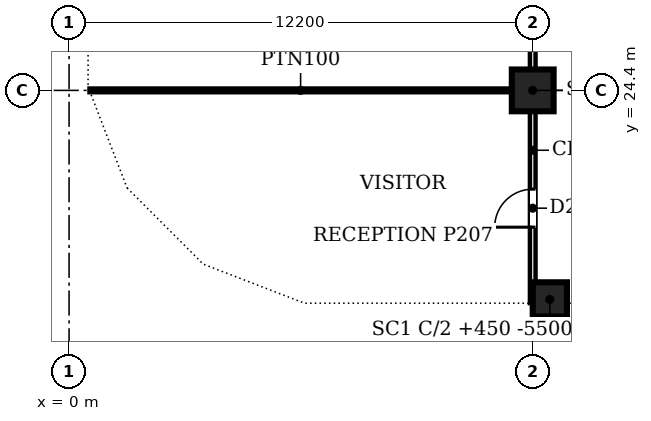
"""IFC4 building model, lengths in metres.
Left out: names, types, materials, properties, quantities, classifications, styles, units other than length and angle.
Written with IfcOpenShell. Run it as: python <this file> out.ifc"""

import sys

from ifc_helpers import new_model, si_unit, direction, frame, frame_2d, origin, origin_2d, place, context, subcontext, project, spatial, polyline, rectangle, outline, extrude, faceted_brep, source, transform, mapped, element, fill, save


model = new_model("IFC4")
c1 = context("Model", 3, precision=1e-05, world=origin(), true_north=direction((0.0, 1.0)))
c2 = subcontext(c1, "Body", "Model", "MODEL_VIEW")
j1 = project(units=[si_unit("LENGTHUNIT", "METRE"), si_unit("PLANEANGLEUNIT", "RADIAN")], contexts=[c1])
p1 = place(None, origin())
s1 = spatial("IfcSite", under=j1, at=p1, CompositionType="ELEMENT")
p2 = place(p1, origin())
s2 = spatial("IfcBuilding", under=s1, at=p2, CompositionType="ELEMENT")
p3 = place(p2, origin())
s3 = spatial("IfcBuildingStorey", under=s2, at=p3, CompositionType="ELEMENT", Elevation=0.0)
p4 = place(p3, frame((12.2, 24.4, 0.0), z_axis=(0.0, 0.0, 1.0), x_axis=(1.0, 0.0, 0.0)))
e1 = element("IfcColumn", 1, at=p4, inside=s3, PredefinedType="COLUMN", context=c2, shape_type="SweptSolid", body=[
    extrude(rectangle(XDim=1.1, YDim=1.1, at=origin_2d()), origin(), (0.0, 0.0, 1.0), 6.95),
])
p5 = place(p3, frame((12.65, 18.9, 0.0), z_axis=(0.0, 0.0, 1.0), x_axis=(1.0, 0.0, 0.0)))
e2 = element("IfcColumn", 2, at=p5, inside=s3, PredefinedType="COLUMN", context=c2, shape_type="SweptSolid", body=[
    extrude(rectangle(XDim=0.9, YDim=0.9, at=origin_2d()), origin(), (0.0, 0.0, 1.0), 7.2),
])
m1 = source(origin(), c2, "Body", "Brep", [
    faceted_brep([(0.0, -0.1, 0.0), (6.072, -0.1, 0.0), (6.072, -0.1, 8.373), (6.053, -0.1, 8.4), (6.035, 0.1, 0.0), (0.0, 0.1, 0.0), (6.035, 0.1, 8.374), (6.053, 0.0, 8.4)], [[[0, 1, 2, 3]], [[4, 5, 6]], [[5, 4, 1, 0]], [[7, 3, 2]], [[6, 5, 0, 3, 7]], [[1, 4, 6, 7, 2]]]),
])
p6 = place(p3, frame((0.25, 30.5, 0.0), z_axis=(0.0, 0.0, 1.0), x_axis=(0.0, -1.0, 0.0)))
e3 = element("IfcWall", 3, at=p6, inside=s3, PredefinedType="PARTITIONING", context=c2, shape_type="MappedRepresentation", body=[
    mapped(m1, transform((0.0, 0.0, 0.0), scale=1.0)),
])
m2 = source(origin(), c2, "Body", "SweptSolid", [
    extrude(outline(polyline([(0.293, 0.15), (5.854, 0.15), (5.854, 7.866), (0.293, 0.15)])), frame((0.0, 0.11, 0.0), z_axis=(0.0, -1.0, 0.0), x_axis=(1.0, 0.0, 0.0)), (0.0, 0.0, 1.0), 0.22),
])
p7 = place(p6, origin())
e4 = element("IfcOpeningElement", 4, at=p7, cuts=e3, PredefinedType="OPENING", context=c2, shape_type="MappedRepresentation", body=[
    mapped(m2, transform((0.0, 0.0, 0.0), scale=1.0)),
])
m3 = source(origin(), c2, "Body", "Brep", [
    faceted_brep([(0.0, -0.25, 0.0), (6.053, -0.25, 8.4), (5.44, -0.25, 8.4), (0.0, -0.25, 0.851), (0.0, 0.25, 0.851), (5.44, 0.25, 8.4), (6.007, 0.25, 8.4), (6.007, 0.25, 8.335), (0.0, 0.25, 0.0), (6.053, 0.0, 8.4)], [[[0, 1, 2, 3]], [[4, 5, 6, 7, 8]], [[8, 7, 9, 1, 0]], [[6, 5, 2, 1, 9]], [[5, 4, 3, 2]], [[4, 8, 0, 3]], [[7, 6, 9]]]),
])
p8 = place(p3, frame((0.25, 30.5, 0.0), z_axis=(0.0, 0.0, 1.0), x_axis=(0.0, -1.0, 0.0)))
e5 = element("IfcWall", 5, at=p8, inside=s3, PredefinedType="SOLIDWALL", context=c2, shape_type="MappedRepresentation", body=[
    mapped(m3, transform((0.0, 0.0, 0.0), scale=1.0)),
])
p9 = place(p2, frame((0.0, 0.0, 7.2)))
s4 = spatial("IfcBuildingStorey", under=s2, at=p9, CompositionType="ELEMENT", Elevation=7.2)
m4 = source(origin(), c2, "Body", "Brep", [
    faceted_brep([(0.0, -0.25, 0.0), (6.053, -0.25, 0.0), (6.053, -0.25, 16.8), (0.0, -0.25, 16.8), (0.047, 0.25, 16.8), (6.053, 0.25, 16.8), (6.053, 0.25, 0.0), (0.047, 0.25, 0.0), (0.0, 0.0, 0.0), (0.0, 0.0, 16.8)], [[[0, 1, 2, 3]], [[4, 5, 6, 7]], [[7, 6, 1, 0, 8]], [[5, 4, 9, 3, 2]], [[8, 0, 3, 9]], [[7, 8, 9, 4]], [[1, 6, 5, 2]]]),
])
p10 = place(p9, frame((6.146, 18.55, -7.2), z_axis=(0.0, 0.0, 1.0), x_axis=(1.0, 0.0, 0.0)))
e6 = element("IfcWall", 6, at=p10, inside=s4, PredefinedType="SOLIDWALL", context=c2, shape_type="MappedRepresentation", body=[
    mapped(m4, transform((0.0, 0.0, 0.0), scale=1.0)),
])
m5 = source(origin(), c2, "Body", "Brep", [
    faceted_brep([(0.0, -0.25, 0.0), (2.95, -0.25, 0.0), (2.95, -0.25, 16.8), (0.0, -0.25, 16.8), (0.047, 0.25, 16.8), (2.898, 0.25, 16.8), (2.898, 0.25, 0.0), (0.047, 0.25, 0.0), (2.95, 0.0, 0.0), (0.0, 0.0, 0.0), (2.95, 0.0, 16.8), (0.0, 0.0, 16.8)], [[[0, 1, 2, 3]], [[4, 5, 6, 7]], [[7, 6, 8, 1, 0, 9]], [[10, 2, 1, 8]], [[5, 4, 11, 3, 2, 10]], [[9, 0, 3, 11]], [[7, 9, 11, 4]], [[8, 6, 5, 10]]]),
])
p11 = place(p9, frame((0.25, 24.447, -7.2), z_axis=(0.0, 0.0, 1.0), x_axis=(0.359877213415, -0.932999673775, 0.0)))
e7 = element("IfcWall", 7, at=p11, inside=s4, PredefinedType="SOLIDWALL", context=c2, shape_type="MappedRepresentation", body=[
    mapped(m5, transform((0.0, 0.0, 0.0), scale=1.0)),
])
m6 = source(origin(), c2, "Body", "Brep", [
    faceted_brep([(0.0, -0.25, 0.0), (3.055, -0.25, 0.0), (3.055, -0.25, 16.8), (0.0, -0.25, 16.8), (0.0, 0.25, 16.8), (3.002, 0.25, 16.8), (3.002, 0.25, 0.0), (0.0, 0.25, 0.0), (3.055, 0.0, 0.0), (3.055, 0.0, 16.8)], [[[0, 1, 2, 3]], [[4, 5, 6, 7]], [[7, 6, 8, 1, 0]], [[9, 2, 1, 8]], [[5, 4, 3, 2, 9]], [[4, 7, 0, 3]], [[8, 6, 5, 9]]]),
])
p12 = place(p9, frame((1.234, 21.772, -7.2), z_axis=(0.0, 0.0, 1.0), x_axis=(0.707146740881, -0.707066819233, 0.0)))
e8 = element("IfcWall", 8, at=p12, inside=s4, PredefinedType="SOLIDWALL", context=c2, shape_type="MappedRepresentation", body=[
    mapped(m6, transform((0.0, 0.0, 0.0), scale=1.0)),
])
m7 = source(origin(), c2, "Body", "Brep", [
    faceted_brep([(0.0, -0.25, 0.0), (2.95, -0.25, 0.0), (2.95, -0.25, 16.8), (0.0, -0.25, 16.8), (0.053, 0.25, 16.8), (2.904, 0.25, 16.8), (2.904, 0.25, 0.0), (0.053, 0.25, 0.0), (2.95, 0.0, 0.0), (0.0, 0.0, 0.0), (2.95, 0.0, 16.8), (0.0, 0.0, 16.8)], [[[0, 1, 2, 3]], [[4, 5, 6, 7]], [[7, 6, 8, 1, 0, 9]], [[10, 2, 1, 8]], [[5, 4, 11, 3, 2, 10]], [[9, 0, 3, 11]], [[7, 9, 11, 4]], [[8, 6, 5, 10]]]),
])
p13 = place(p9, frame((3.394, 19.612, -7.2), z_axis=(0.0, 0.0, 1.0), x_axis=(0.932999673775, -0.359877213415, 0.0)))
e9 = element("IfcWall", 9, at=p13, inside=s4, PredefinedType="SOLIDWALL", context=c2, shape_type="MappedRepresentation", body=[
    mapped(m7, transform((0.0, 0.0, 0.0), scale=1.0)),
])
p14 = place(p3, frame((12.2, 18.8, 0.0), z_axis=(0.0, 0.0, 1.0), x_axis=(0.0, 1.0, 0.0)))
e10 = element("IfcWall", 10, at=p14, inside=s3, PredefinedType="PARTITIONING", context=c2, shape_type="SweptSolid", body=[
    extrude(rectangle(XDim=5.049, YDim=0.15, at=frame_2d((2.524, 0.0))), origin(), (0.0, 0.0, 1.0), 6.115),
])
m8 = source(origin(), c2, "Body", "SweptSolid", [
    extrude(rectangle(XDim=1.0, YDim=2.1, at=frame_2d((0.5, 1.05))), frame((0.0, 0.085, 0.0), z_axis=(0.0, -1.0, 0.0), x_axis=(1.0, 0.0, 0.0)), (0.0, 0.0, 1.0), 0.17),
])
p15 = place(p14, frame((2.0, 0.0, 0.0)))
e11 = element("IfcOpeningElement", 11, at=p15, cuts=e10, PredefinedType="OPENING", context=c2, shape_type="MappedRepresentation", body=[
    mapped(m8, transform((0.0, 0.0, 0.0), scale=1.0)),
])
p16 = place(p3, frame((0.536, 24.4, 0.0), z_axis=(0.0, 0.0, 1.0), x_axis=(1.0, 0.0, 0.0)))
e12 = element("IfcWall", 12, at=p16, inside=s3, PredefinedType="PARTITIONING", context=c2, shape_type="SweptSolid", body=[
    extrude(rectangle(XDim=11.113, YDim=0.1, at=frame_2d((5.557, 0.0))), origin(), (0.0, 0.0, 1.0), 6.115),
])
p17 = place(p3, frame((12.2, 24.951, 0.0), z_axis=(0.0, 0.0, 1.0), x_axis=(0.0, 1.0, 0.0)))
e13 = element("IfcWall", 13, at=p17, inside=s3, PredefinedType="PARTITIONING", context=c2, shape_type="SweptSolid", body=[
    extrude(rectangle(XDim=11.098, YDim=0.15, at=frame_2d((5.549, 0.0))), origin(), (0.0, 0.0, 1.0), 6.115),
])
m9 = source(origin(), c2, "Body", "SweptSolid", [
    extrude(rectangle(XDim=1.8, YDim=2.1, at=frame_2d((0.9, 1.05))), frame((0.0, 0.085, 0.0), z_axis=(0.0, -1.0, 0.0), x_axis=(1.0, 0.0, 0.0)), (0.0, 0.0, 1.0), 0.17),
])
p18 = place(p17, frame((4.6, 0.0, 0.0)))
e14 = element("IfcOpeningElement", 14, at=p18, cuts=e13, PredefinedType="OPENING", context=c2, shape_type="MappedRepresentation", body=[
    mapped(m9, transform((0.0, 0.0, 0.0), scale=1.0)),
])
m10 = source(origin(), c2, "Body", "SweptSolid", [
    extrude(rectangle(XDim=1.0, YDim=2.1, at=frame_2d((0.5, 1.05))), frame((0.0, 0.025, 0.0), z_axis=(0.0, -1.0, 0.0), x_axis=(1.0, 0.0, 0.0)), (0.0, 0.0, 1.0), 0.05),
])
p19 = place(p15, origin())
e15 = element("IfcDoor", 15, at=p19, inside=s3, OperationType="SINGLE_SWING_LEFT", PredefinedType="DOOR", context=c2, shape_type="MappedRepresentation", body=[
    mapped(m10, transform((0.0, 0.0, 0.0), scale=1.0)),
])
fill(e11, e15)
save(model, sys.argv[1])
